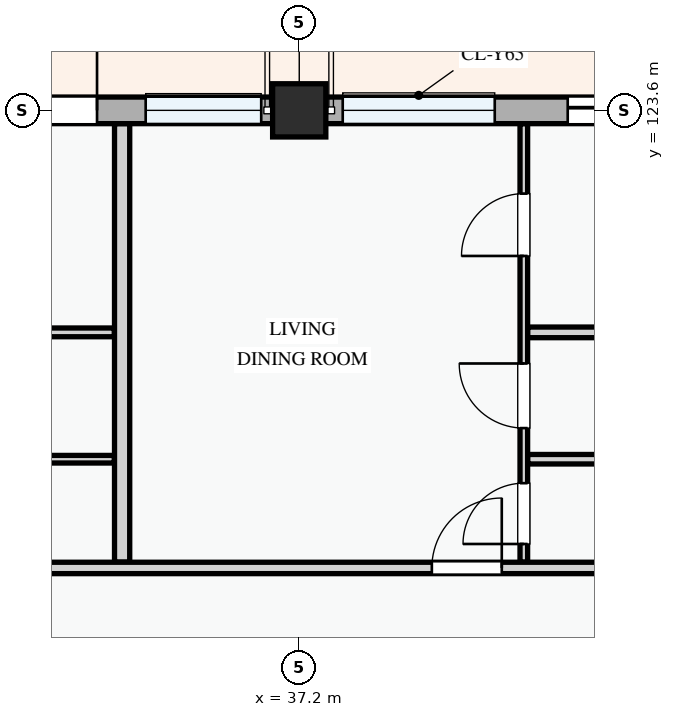
"""IFC4 building model, lengths in metres.
Left out: names, types, materials, properties, quantities, classifications, styles, units other than length and angle.
Written with IfcOpenShell. Run it as: python <this file> out.ifc"""

import sys

from ifc_helpers import new_model, si_unit, direction, frame, frame_2d, origin, origin_2d, place, context, subcontext, project, spatial, rectangle, extrude, element, fill, save


model = new_model("IFC4")
c1 = context("Model", 3, precision=1e-05, world=origin(), true_north=direction((0.0, 1.0)))
c2 = subcontext(c1, "Body", "Model", "MODEL_VIEW")
j1 = project(units=[si_unit("LENGTHUNIT", "METRE"), si_unit("PLANEANGLEUNIT", "RADIAN")], contexts=[c1])
p1 = place(None, origin())
s1 = spatial("IfcSite", under=j1, at=p1, CompositionType="ELEMENT")
p2 = place(p1, origin())
s2 = spatial("IfcBuilding", under=s1, at=p2, CompositionType="ELEMENT")
p3 = place(p2, frame((0.0, 0.0, 14.7)))
s3 = spatial("IfcBuildingStorey", under=s2, at=p3, CompositionType="ELEMENT", Elevation=14.7)
p4 = place(p3, frame((37.2, 123.6, 0.0), z_axis=(0.0, 0.0, 1.0), x_axis=(1.0, 0.0, 0.0)))
e1 = element("IfcColumn", 1, at=p4, inside=s3, PredefinedType="COLUMN", context=c2, shape_type="SweptSolid", body=[
    extrude(rectangle(XDim=0.7, YDim=0.7, at=origin_2d()), origin(), (0.0, 0.0, 1.0), 3.3),
])
p5 = place(p3, frame((43.2, 123.6, 0.0), z_axis=(0.0, 0.0, 1.0), x_axis=(-1.0, 0.0, 0.0)))
e2 = element("IfcWall", 2, at=p5, inside=s3, PredefinedType="STANDARD", context=c2, shape_type="SweptSolid", body=[
    extrude(rectangle(XDim=6.0, YDim=0.35, at=frame_2d((3.0, 0.0))), origin(), (0.0, 0.0, 1.0), 2.445),
])
p6 = place(p5, frame((0.868, 0.0, 0.0)))
e3 = element("IfcOpeningElement", 3, at=p6, cuts=e2, PredefinedType="OPENING", context=c2, shape_type="SweptSolid", body=[
    extrude(rectangle(XDim=1.6, YDim=2.2, at=frame_2d((0.8, 1.1))), frame((0.0, 0.185, 0.0), z_axis=(0.0, -1.0, 0.0), x_axis=(1.0, 0.0, 0.0)), (0.0, 0.0, 1.0), 0.37),
])
p7 = place(p5, frame((3.427, 0.0, 0.78)))
e4 = element("IfcOpeningElement", 4, at=p7, cuts=e2, PredefinedType="OPENING", context=c2, shape_type="SweptSolid", body=[
    extrude(rectangle(XDim=2.0, YDim=1.5, at=frame_2d((1.0, 0.75))), frame((0.0, 0.185, 0.0), z_axis=(0.0, -1.0, 0.0), x_axis=(1.0, 0.0, 0.0)), (0.0, 0.0, 1.0), 0.37),
])
p8 = place(p3, frame((37.2, 123.6, 0.0), z_axis=(0.0, 0.0, 1.0), x_axis=(-1.0, 0.0, 0.0)))
e5 = element("IfcWall", 5, at=p8, inside=s3, PredefinedType="STANDARD", context=c2, shape_type="SweptSolid", body=[
    extrude(rectangle(XDim=8.4, YDim=0.35, at=frame_2d((4.2, 0.0))), origin(), (0.0, 0.0, 1.0), 2.345),
])
p9 = place(p8, frame((2.66, 0.0, 0.0)))
e6 = element("IfcOpeningElement", 6, at=p9, cuts=e5, PredefinedType="OPENING", context=c2, shape_type="SweptSolid", body=[
    extrude(rectangle(XDim=1.05, YDim=2.15, at=frame_2d((0.525, 1.075))), frame((0.0, 0.185, 0.0), z_axis=(0.0, -1.0, 0.0), x_axis=(1.0, 0.0, 0.0)), (0.0, 0.0, 1.0), 0.37),
])
p10 = place(p8, frame((0.5, 0.0, 0.78)))
e7 = element("IfcOpeningElement", 7, at=p10, cuts=e5, PredefinedType="OPENING", context=c2, shape_type="SweptSolid", body=[
    extrude(rectangle(XDim=1.52, YDim=1.42, at=frame_2d((0.76, 0.71))), frame((0.0, 0.185, 0.0), z_axis=(0.0, -1.0, 0.0), x_axis=(1.0, 0.0, 0.0)), (0.0, 0.0, 1.0), 0.37),
])
p11 = place(p8, frame((4.412, 0.0, 0.78)))
e8 = element("IfcOpeningElement", 8, at=p11, cuts=e5, PredefinedType="OPENING", context=c2, shape_type="SweptSolid", body=[
    extrude(rectangle(XDim=1.52, YDim=1.42, at=frame_2d((0.76, 0.71))), frame((0.0, 0.185, 0.0), z_axis=(0.0, -1.0, 0.0), x_axis=(1.0, 0.0, 0.0)), (0.0, 0.0, 1.0), 0.37),
])
p12 = place(p8, frame((6.947, 0.0, 0.78)))
e9 = element("IfcOpeningElement", 9, at=p12, cuts=e5, PredefinedType="OPENING", context=c2, shape_type="SweptSolid", body=[
    extrude(rectangle(XDim=0.9, YDim=1.2, at=frame_2d((0.45, 0.6))), frame((0.0, 0.185, 0.0), z_axis=(0.0, -1.0, 0.0), x_axis=(1.0, 0.0, 0.0)), (0.0, 0.0, 1.0), 0.37),
])
p13 = place(p3, frame((30.68, 120.679, 0.0), z_axis=(0.0, 0.0, 1.0), x_axis=(1.0, 0.0, 0.0)))
e10 = element("IfcWall", 10, at=p13, inside=s3, PredefinedType="PARTITIONING", context=c2, shape_type="SweptSolid", body=[
    extrude(rectangle(XDim=4.088, YDim=0.115, at=frame_2d((2.044, 0.0))), origin(), (0.0, 0.0, 1.0), 3.0),
])
p14 = place(p3, frame((30.68, 119.01, 0.0), z_axis=(0.0, 0.0, 1.0), x_axis=(1.0, 0.0, 0.0)))
e11 = element("IfcWall", 11, at=p14, inside=s3, PredefinedType="PARTITIONING", context=c2, shape_type="SweptSolid", body=[
    extrude(rectangle(XDim=4.088, YDim=0.1, at=frame_2d((2.044, 0.0))), origin(), (0.0, 0.0, 1.0), 3.0),
])
p15 = place(p3, frame((40.155, 117.657, 0.0), z_axis=(0.0, 0.0, 1.0), x_axis=(0.0, 1.0, 0.0)))
e12 = element("IfcWall", 12, at=p15, inside=s3, PredefinedType="PARTITIONING", context=c2, shape_type="SweptSolid", body=[
    extrude(rectangle(XDim=5.766, YDim=0.1, at=frame_2d((2.883, 0.0))), origin(), (0.0, 0.0, 1.0), 3.0),
])
p16 = place(p15, frame((0.238, 0.0, 0.0)))
e13 = element("IfcOpeningElement", 13, at=p16, cuts=e12, PredefinedType="OPENING", context=c2, shape_type="SweptSolid", body=[
    extrude(rectangle(XDim=0.8, YDim=2.1, at=frame_2d((0.4, 1.05))), frame((0.0, 0.06, 0.0), z_axis=(0.0, -1.0, 0.0), x_axis=(1.0, 0.0, 0.0)), (0.0, 0.0, 1.0), 0.12),
])
p17 = place(p15, frame((1.763, 0.0, 0.0)))
e14 = element("IfcOpeningElement", 14, at=p17, cuts=e12, PredefinedType="OPENING", context=c2, shape_type="SweptSolid", body=[
    extrude(rectangle(XDim=0.85, YDim=2.1, at=frame_2d((0.425, 1.05))), frame((0.0, 0.06, 0.0), z_axis=(0.0, -1.0, 0.0), x_axis=(1.0, 0.0, 0.0)), (0.0, 0.0, 1.0), 0.12),
])
p18 = place(p15, frame((4.028, 0.0, 0.0)))
e15 = element("IfcOpeningElement", 15, at=p18, cuts=e12, PredefinedType="OPENING", context=c2, shape_type="SweptSolid", body=[
    extrude(rectangle(XDim=0.82, YDim=2.08, at=frame_2d((0.41, 1.04))), frame((0.0, 0.06, 0.0), z_axis=(0.0, -1.0, 0.0), x_axis=(1.0, 0.0, 0.0)), (0.0, 0.0, 1.0), 0.12),
])
p19 = place(p3, frame((40.207, 120.679, 0.0), z_axis=(0.0, 0.0, 1.0), x_axis=(1.0, 0.0, 0.0)))
e16 = element("IfcWall", 16, at=p19, inside=s3, PredefinedType="PARTITIONING", context=c2, shape_type="SweptSolid", body=[
    extrude(rectangle(XDim=5.579, YDim=0.14, at=frame_2d((2.789, 0.0))), origin(), (0.0, 0.0, 1.0), 3.0),
])
p20 = place(p3, frame((40.207, 119.01, 0.0), z_axis=(0.0, 0.0, 1.0), x_axis=(1.0, 0.0, 0.0)))
e17 = element("IfcWall", 17, at=p20, inside=s3, PredefinedType="PARTITIONING", context=c2, shape_type="SweptSolid", body=[
    extrude(rectangle(XDim=5.579, YDim=0.125, at=frame_2d((2.789, 0.0))), origin(), (0.0, 0.0, 1.0), 3.0),
])
p21 = place(p3, frame((34.87, 117.657, 0.0), z_axis=(0.0, 0.0, 1.0), x_axis=(0.0, 1.0, 0.0)))
e18 = element("IfcWall", 18, at=p21, inside=s3, PredefinedType="PARTITIONING", context=c2, shape_type="SweptSolid", body=[
    extrude(rectangle(XDim=5.766, YDim=0.2, at=frame_2d((2.883, 0.0))), origin(), (0.0, 0.0, 1.0), 3.0),
])
p22 = place(p3, frame((22.66, 117.58, 0.0), z_axis=(0.0, 0.0, 1.0), x_axis=(1.0, 0.0, 0.0)))
e19 = element("IfcWall", 19, at=p22, inside=s3, PredefinedType="PARTITIONING", context=c2, shape_type="SweptSolid", body=[
    extrude(rectangle(XDim=34.763, YDim=0.15, at=frame_2d((17.382, 0.0))), origin(), (0.0, 0.0, 1.0), 3.0),
])
p23 = place(p22, frame((2.74, 0.0, 0.0)))
e20 = element("IfcOpeningElement", 20, at=p23, cuts=e19, PredefinedType="OPENING", context=c2, shape_type="SweptSolid", body=[
    extrude(rectangle(XDim=0.96, YDim=2.12, at=frame_2d((0.48, 1.06))), frame((0.0, 0.085, 0.0), z_axis=(0.0, -1.0, 0.0), x_axis=(1.0, 0.0, 0.0)), (0.0, 0.0, 1.0), 0.17),
])
p24 = place(p22, frame((16.285, 0.0, 0.0)))
e21 = element("IfcOpeningElement", 21, at=p24, cuts=e19, PredefinedType="OPENING", context=c2, shape_type="SweptSolid", body=[
    extrude(rectangle(XDim=0.92, YDim=2.1, at=frame_2d((0.46, 1.05))), frame((0.0, 0.085, 0.0), z_axis=(0.0, -1.0, 0.0), x_axis=(1.0, 0.0, 0.0)), (0.0, 0.0, 1.0), 0.17),
])
p25 = place(p22, frame((24.263, 0.0, 0.0)))
e22 = element("IfcOpeningElement", 22, at=p25, cuts=e19, PredefinedType="OPENING", context=c2, shape_type="SweptSolid", body=[
    extrude(rectangle(XDim=0.92, YDim=2.1, at=frame_2d((0.46, 1.05))), frame((0.0, 0.085, 0.0), z_axis=(0.0, -1.0, 0.0), x_axis=(1.0, 0.0, 0.0)), (0.0, 0.0, 1.0), 0.17),
])
p26 = place(p6, frame((1.6, 0.0, 0.0), z_axis=(0.0, 0.0, 1.0), x_axis=(-1.0, 0.0, 0.0)))
e23 = element("IfcDoor", 23, at=p26, inside=s3, OperationType="SLIDING_TO_LEFT", PredefinedType="DOOR", context=c2, shape_type="SweptSolid", body=[
    extrude(rectangle(XDim=1.6, YDim=2.2, at=frame_2d((0.8, 1.1))), frame((0.0, 0.025, 0.0), z_axis=(0.0, -1.0, 0.0), x_axis=(1.0, 0.0, 0.0)), (0.0, 0.0, 1.0), 0.05),
])
fill(e3, e23)
p27 = place(p7, origin())
e24 = element("IfcWindow", 24, at=p27, inside=s3, PartitioningType="DOUBLE_PANEL_VERTICAL", PredefinedType="WINDOW", context=c2, shape_type="SweptSolid", body=[
    extrude(rectangle(XDim=2.0, YDim=1.5, at=frame_2d((1.0, 0.75))), frame((0.0, 0.03, 0.0), z_axis=(0.0, -1.0, 0.0), x_axis=(1.0, 0.0, 0.0)), (0.0, 0.0, 1.0), 0.06),
])
fill(e4, e24)
p28 = place(p9, frame((1.05, 0.0, 0.0), z_axis=(0.0, 0.0, 1.0), x_axis=(-1.0, 0.0, 0.0)))
e25 = element("IfcDoor", 25, at=p28, inside=s3, OperationType="SINGLE_SWING_RIGHT", PredefinedType="DOOR", context=c2, shape_type="SweptSolid", body=[
    extrude(rectangle(XDim=1.05, YDim=2.15, at=frame_2d((0.525, 1.075))), frame((0.0, 0.025, 0.0), z_axis=(0.0, -1.0, 0.0), x_axis=(1.0, 0.0, 0.0)), (0.0, 0.0, 1.0), 0.05),
])
fill(e6, e25)
p29 = place(p10, origin())
e26 = element("IfcWindow", 26, at=p29, inside=s3, PartitioningType="SINGLE_PANEL", PredefinedType="WINDOW", context=c2, shape_type="SweptSolid", body=[
    extrude(rectangle(XDim=1.52, YDim=1.42, at=frame_2d((0.76, 0.71))), frame((0.0, 0.03, 0.0), z_axis=(0.0, -1.0, 0.0), x_axis=(1.0, 0.0, 0.0)), (0.0, 0.0, 1.0), 0.06),
])
fill(e7, e26)
p30 = place(p16, origin())
e27 = element("IfcDoor", 27, at=p30, inside=s3, OperationType="SINGLE_SWING_LEFT", PredefinedType="DOOR", context=c2, shape_type="SweptSolid", body=[
    extrude(rectangle(XDim=0.8, YDim=2.1, at=frame_2d((0.4, 1.05))), frame((0.0, 0.025, 0.0), z_axis=(0.0, -1.0, 0.0), x_axis=(1.0, 0.0, 0.0)), (0.0, 0.0, 1.0), 0.05),
])
fill(e13, e27)
p31 = place(p17, origin())
e28 = element("IfcDoor", 28, at=p31, inside=s3, OperationType="SINGLE_SWING_RIGHT", PredefinedType="DOOR", context=c2, shape_type="SweptSolid", body=[
    extrude(rectangle(XDim=0.85, YDim=2.1, at=frame_2d((0.425, 1.05))), frame((0.0, 0.025, 0.0), z_axis=(0.0, -1.0, 0.0), x_axis=(1.0, 0.0, 0.0)), (0.0, 0.0, 1.0), 0.05),
])
fill(e14, e28)
p32 = place(p18, origin())
e29 = element("IfcDoor", 29, at=p32, inside=s3, OperationType="SINGLE_SWING_LEFT", PredefinedType="DOOR", context=c2, shape_type="SweptSolid", body=[
    extrude(rectangle(XDim=0.82, YDim=2.08, at=frame_2d((0.41, 1.04))), frame((0.0, 0.025, 0.0), z_axis=(0.0, -1.0, 0.0), x_axis=(1.0, 0.0, 0.0)), (0.0, 0.0, 1.0), 0.05),
])
fill(e15, e29)
p33 = place(p24, origin())
e30 = element("IfcDoor", 30, at=p33, inside=s3, OperationType="SINGLE_SWING_RIGHT", PredefinedType="DOOR", context=c2, shape_type="SweptSolid", body=[
    extrude(rectangle(XDim=0.92, YDim=2.1, at=frame_2d((0.46, 1.05))), frame((0.0, 0.025, 0.0), z_axis=(0.0, -1.0, 0.0), x_axis=(1.0, 0.0, 0.0)), (0.0, 0.0, 1.0), 0.05),
])
fill(e21, e30)
save(model, sys.argv[1])
